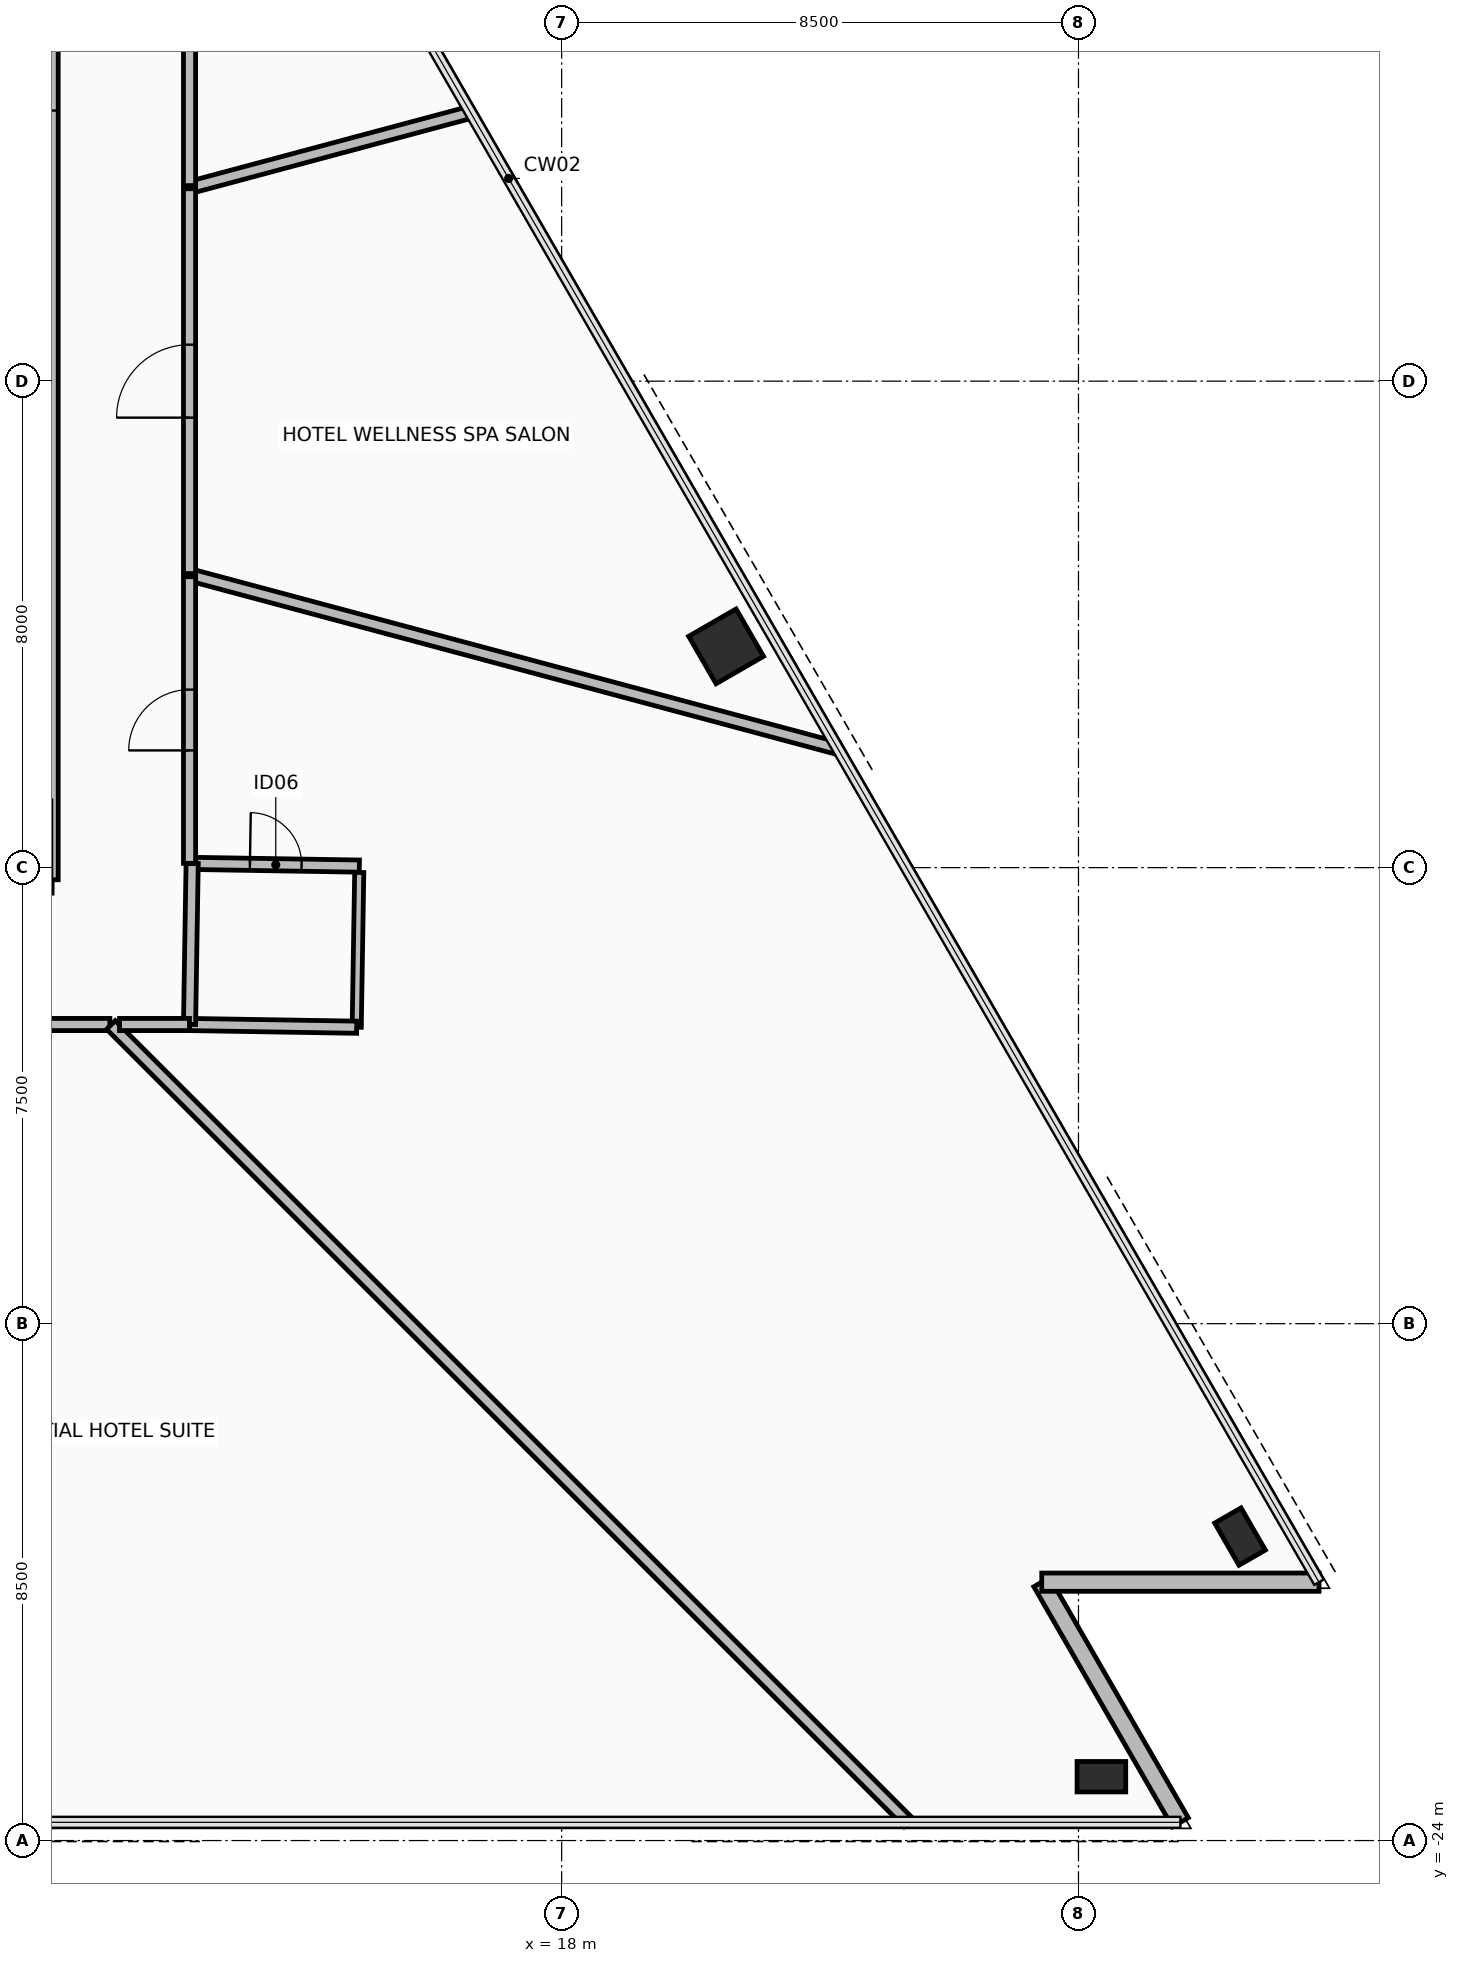
"""IFC4 building model, lengths in metres.
Left out: names, types, materials, properties, quantities, classifications, styles, units other than length and angle.
Written with IfcOpenShell. Run it as: python <this file> out.ifc"""

import sys

from ifc_helpers import new_model, si_unit, direction, frame, frame_2d, origin, origin_2d, place, context, subcontext, project, spatial, rectangle, hollow_rectangle, extrude, element, fill, save


model = new_model("IFC4")
c1 = context("Model", 3, precision=1e-05, world=origin(), true_north=direction((0.0, 1.0)))
c2 = subcontext(c1, "Body", "Model", "MODEL_VIEW")
j1 = project(units=[si_unit("LENGTHUNIT", "METRE"), si_unit("PLANEANGLEUNIT", "RADIAN")], contexts=[c1])
p1 = place(None, origin())
s1 = spatial("IfcSite", under=j1, at=p1, CompositionType="ELEMENT")
p2 = place(p1, origin())
s2 = spatial("IfcBuilding", under=s1, at=p2, CompositionType="ELEMENT")
p3 = place(p2, frame((0.0, 0.0, 52.25)))
s3 = spatial("IfcBuildingStorey", under=s2, at=p3, CompositionType="ELEMENT", Elevation=52.25)
for number, where, z_axis, x_axis in (
    (1, (26.877, -22.95, 0.0), (0.0, 0.0, 1.0), (1.0, 0.0, 0.0)),
    (2, (29.157, -19.001, 0.0), (0.0, 0.0, 1.0), (-0.5, 0.866, 0.0)),
):
    element("IfcColumn", number, at=place(p3, frame(where, z_axis=z_axis, x_axis=x_axis)), inside=s3, PredefinedType="COLUMN", context=c2, shape_type="SweptSolid", body=[
        extrude(hollow_rectangle(XDim=0.5, YDim=0.8, WallThickness=0.04, at=origin_2d()), origin(), (0.0, 0.0, 1.0), 4.75),
    ])
p4 = place(p3, frame((20.705, -4.361, 0.0), z_axis=(0.0, 0.0, 1.0), x_axis=(-0.500001511499, 0.866024531118, 0.0)))
e3 = element("IfcColumn", 3, at=p4, inside=s3, PredefinedType="COLUMN", context=c2, shape_type="SweptSolid", body=[
    extrude(hollow_rectangle(XDim=0.9, YDim=0.9, WallThickness=0.05, at=origin_2d()), origin(), (0.0, 0.0, 1.0), 4.75),
])
p5 = place(p3, frame((28.176, -23.7, 0.0), z_axis=(0.0, 0.0, 1.0), x_axis=(-0.500014431597, 0.866017071537, 0.0)))
e4 = element("IfcWall", 4, at=p5, inside=s3, PredefinedType="STANDARD", context=c2, shape_type="SweptSolid", body=[
    extrude(rectangle(XDim=4.56, YDim=0.3, at=frame_2d((2.28, 0.0))), origin(), (0.0, 0.0, 1.0), 2.255),
])
p6 = place(p3, frame((25.896, -19.751, 0.0), z_axis=(0.0, 0.0, 1.0), x_axis=(1.0, 0.0, 0.0)))
e5 = element("IfcWall", 5, at=p6, inside=s3, PredefinedType="STANDARD", context=c2, shape_type="SweptSolid", body=[
    extrude(rectangle(XDim=4.56, YDim=0.3, at=frame_2d((2.28, 0.0))), origin(), (0.0, 0.0, 1.0), 2.255),
])
p7 = place(p3, frame((-9.62, -8.32, 0.0), z_axis=(0.0, 0.0, 1.0), x_axis=(1.0, 0.0, 0.0)))
e6 = element("IfcWall", 6, at=p7, inside=s3, PredefinedType="PARTITIONING", context=c2, shape_type="SweptSolid", body=[
    extrude(rectangle(XDim=19.24, YDim=0.2, at=frame_2d((9.62, 0.0))), origin(), (0.0, 0.0, 1.0), 2.355),
])
p8 = place(p7, frame((13.97, 0.0, 0.0)))
e7 = element("IfcOpeningElement", 7, at=p8, cuts=e6, PredefinedType="OPENING", context=c2, shape_type="SweptSolid", body=[
    extrude(rectangle(XDim=0.9, YDim=2.1, at=frame_2d((0.45, 1.05))), frame((0.0, 0.11, 0.0), z_axis=(0.0, -1.0, 0.0), x_axis=(1.0, 0.0, 0.0)), (0.0, 0.0, 1.0), 0.22),
])
p9 = place(p3, frame((9.62, -8.2, 0.0), z_axis=(0.0, 0.0, 1.0), x_axis=(0.0, 1.0, 0.0)))
e8 = element("IfcWall", 8, at=p9, inside=s3, PredefinedType="PARTITIONING", context=c2, shape_type="SweptSolid", body=[
    extrude(rectangle(XDim=16.4, YDim=0.2, at=frame_2d((8.2, 0.0))), origin(), (0.0, 0.0, 1.0), 2.355),
])
p10 = place(p9, frame((12.65, 0.0, 0.0)))
e9 = element("IfcOpeningElement", 9, at=p10, cuts=e8, PredefinedType="OPENING", context=c2, shape_type="SweptSolid", body=[
    extrude(rectangle(XDim=1.1, YDim=2.15, at=frame_2d((0.55, 1.075))), frame((0.0, 0.11, 0.0), z_axis=(0.0, -1.0, 0.0), x_axis=(1.0, 0.0, 0.0)), (0.0, 0.0, 1.0), 0.22),
])
p11 = place(p3, frame((11.923, -7.93, 0.0), z_axis=(0.0, 0.0, 1.0), x_axis=(0.999868029143, -0.016245747077, 0.0)))
e10 = element("IfcWall", 10, at=p11, inside=s3, PredefinedType="PARTITIONING", context=c2, shape_type="SweptSolid", body=[
    extrude(rectangle(XDim=2.75, YDim=0.2, at=frame_2d((1.375, 0.0))), origin(), (0.0, 0.0, 1.0), 4.56),
])
p12 = place(p11, frame((0.95, 0.0, 0.0)))
e11 = element("IfcOpeningElement", 11, at=p12, cuts=e10, PredefinedType="OPENING", context=c2, shape_type="SweptSolid", body=[
    extrude(rectangle(XDim=0.85, YDim=2.1, at=frame_2d((0.425, 1.05))), frame((0.0, 0.11, 0.0), z_axis=(0.0, -1.0, 0.0), x_axis=(1.0, 0.0, 0.0)), (0.0, 0.0, 1.0), 0.22),
])
p13 = place(p3, frame((14.671, -8.08, 0.0), z_axis=(0.0, 0.0, 1.0), x_axis=(-0.016307914507, -0.99986701712, 0.0)))
e12 = element("IfcWall", 12, at=p13, inside=s3, PredefinedType="PARTITIONING", context=c2, shape_type="SweptSolid", body=[
    extrude(rectangle(XDim=2.545, YDim=0.15, at=frame_2d((1.272, 0.0))), origin(), (0.0, 0.0, 1.0), 2.355),
])
p14 = place(p3, frame((14.63, -10.625, 0.0), z_axis=(0.0, 0.0, 1.0), x_axis=(-0.999868029143, 0.016245747077, 0.0)))
e13 = element("IfcWall", 13, at=p14, inside=s3, PredefinedType="PARTITIONING", context=c2, shape_type="SweptSolid", body=[
    extrude(rectangle(XDim=2.75, YDim=0.2, at=frame_2d((1.375, 0.0))), origin(), (0.0, 0.0, 1.0), 2.355),
])
p15 = place(p3, frame((11.88, -10.578, 0.0), z_axis=(0.0, 0.0, 1.0), x_axis=(0.016318711927, 0.999866840955, 0.0)))
e14 = element("IfcWall", 14, at=p15, inside=s3, PredefinedType="PARTITIONING", context=c2, shape_type="SweptSolid", body=[
    extrude(rectangle(XDim=2.648, YDim=0.2, at=frame_2d((1.324, 0.0))), origin(), (0.0, 0.0, 1.0), 2.355),
])
p16 = place(p3, frame((16.5, 4.421, 0.0), z_axis=(0.0, 0.0, 1.0), x_axis=(-0.965923733473, -0.258826855473, 0.0)))
e15 = element("IfcWall", 15, at=p16, inside=s3, PredefinedType="PARTITIONING", context=c2, shape_type="SweptSolid", body=[
    extrude(rectangle(XDim=4.75, YDim=0.2, at=frame_2d((2.375, 0.0))), origin(), (0.0, 0.0, 1.0), 2.255),
])
p17 = place(p3, frame((11.88, 3.216, 0.0), z_axis=(0.0, 0.0, 1.0), x_axis=(0.0, 1.0, 0.0)))
e16 = element("IfcWall", 16, at=p17, inside=s3, PredefinedType="PARTITIONING", context=c2, shape_type="SweptSolid", body=[
    extrude(rectangle(XDim=7.259, YDim=0.2, at=frame_2d((3.63, 0.0))), origin(), (0.0, 0.0, 1.0), 2.255),
])
p18 = place(p17, frame((3.03, 0.0, 0.0)))
e17 = element("IfcOpeningElement", 17, at=p18, cuts=e16, PredefinedType="OPENING", context=c2, shape_type="SweptSolid", body=[
    extrude(rectangle(XDim=1.2, YDim=2.15, at=frame_2d((0.6, 1.075))), frame((0.0, 0.11, 0.0), z_axis=(0.0, -1.0, 0.0), x_axis=(1.0, 0.0, 0.0)), (0.0, 0.0, 1.0), 0.22),
])
p19 = place(p3, frame((2.867, -10.58, 0.0), z_axis=(0.0, 0.0, 1.0), x_axis=(1.0, 0.0, 0.0)))
e18 = element("IfcWall", 18, at=p19, inside=s3, PredefinedType="PARTITIONING", context=c2, shape_type="SweptSolid", body=[
    extrude(rectangle(XDim=7.702, YDim=0.2, at=frame_2d((3.851, 0.0))), origin(), (0.0, 0.0, 1.0), 2.355),
])
p20 = place(p19, frame((3.351, 0.0, 0.0)))
e19 = element("IfcOpeningElement", 19, at=p20, cuts=e18, PredefinedType="OPENING", context=c2, shape_type="SweptSolid", body=[
    extrude(rectangle(XDim=1.0, YDim=2.15, at=frame_2d((0.5, 1.075))), frame((0.0, 0.11, 0.0), z_axis=(0.0, -1.0, 0.0), x_axis=(1.0, 0.0, 0.0)), (0.0, 0.0, 1.0), 0.22),
])
p21 = place(p3, frame((10.587, -10.587, 0.0), z_axis=(0.0, 0.0, 1.0), x_axis=(0.707106781187, -0.707106781187, 0.0)))
e20 = element("IfcWall", 20, at=p21, inside=s3, PredefinedType="PARTITIONING", context=c2, shape_type="SweptSolid", body=[
    extrude(rectangle(XDim=18.544, YDim=0.2, at=frame_2d((9.272, 0.0))), origin(), (0.0, 0.0, 1.0), 2.255),
])
p22 = place(p3, frame((11.912, -3.192, 0.0), z_axis=(0.0, 0.0, 1.0), x_axis=(0.965922374415, -0.258831927328, 0.0)))
e21 = element("IfcWall", 21, at=p22, inside=s3, PredefinedType="PARTITIONING", context=c2, shape_type="SweptSolid", body=[
    extrude(rectangle(XDim=10.992, YDim=0.2, at=frame_2d((5.496, 0.0))), origin(), (0.0, 0.0, 1.0), 2.255),
])
p23 = place(p3, frame((10.729, -10.58, 0.0), z_axis=(0.0, 0.0, 1.0), x_axis=(1.0, 0.0, 0.0)))
e22 = element("IfcWall", 22, at=p23, inside=s3, PredefinedType="PARTITIONING", context=c2, shape_type="SweptSolid", body=[
    extrude(rectangle(XDim=1.151, YDim=0.2, at=frame_2d((0.575, 0.0))), origin(), (0.0, 0.0, 1.0), 4.56),
])
p24 = place(p3, frame((11.88, -7.93, 0.0), z_axis=(0.0, 0.0, 1.0), x_axis=(0.0, 1.0, 0.0)))
e23 = element("IfcWall", 23, at=p24, inside=s3, PredefinedType="PARTITIONING", context=c2, shape_type="SweptSolid", body=[
    extrude(rectangle(XDim=4.714, YDim=0.2, at=frame_2d((2.357, 0.0))), origin(), (0.0, 0.0, 1.0), 2.755),
])
p25 = place(p24, frame((1.857, 0.0, 0.0)))
e24 = element("IfcOpeningElement", 24, at=p25, cuts=e23, PredefinedType="OPENING", context=c2, shape_type="SweptSolid", body=[
    extrude(rectangle(XDim=1.0, YDim=2.15, at=frame_2d((0.5, 1.075))), frame((0.0, 0.11, 0.0), z_axis=(0.0, -1.0, 0.0), x_axis=(1.0, 0.0, 0.0)), (0.0, 0.0, 1.0), 0.22),
])
p26 = place(p3, frame((11.88, -3.164, 0.0), z_axis=(0.0, 0.0, 1.0), x_axis=(0.0, 1.0, 0.0)))
e25 = element("IfcWall", 25, at=p26, inside=s3, PredefinedType="PARTITIONING", context=c2, shape_type="SweptSolid", body=[
    extrude(rectangle(XDim=6.328, YDim=0.2, at=frame_2d((3.164, 0.0))), origin(), (0.0, 0.0, 1.0), 4.56),
])
p27 = place(p26, frame((2.564, 0.0, 0.0)))
e26 = element("IfcOpeningElement", 26, at=p27, cuts=e25, PredefinedType="OPENING", context=c2, shape_type="SweptSolid", body=[
    extrude(rectangle(XDim=1.2, YDim=2.15, at=frame_2d((0.6, 1.075))), frame((0.0, 0.11, 0.0), z_axis=(0.0, -1.0, 0.0), x_axis=(1.0, 0.0, 0.0)), (0.0, 0.0, 1.0), 0.22),
])
p28 = place(p10, frame((1.1, 0.0, 0.0), z_axis=(0.0, 0.0, 1.0), x_axis=(-1.0, 0.0, 0.0)))
e27 = element("IfcDoor", 27, at=p28, inside=s3, OperationType="SINGLE_SWING_LEFT", PredefinedType="DOOR", context=c2, shape_type="SweptSolid", body=[
    extrude(rectangle(XDim=1.1, YDim=2.15, at=frame_2d((0.55, 1.075))), frame((0.0, 0.025, 0.0), z_axis=(0.0, -1.0, 0.0), x_axis=(1.0, 0.0, 0.0)), (0.0, 0.0, 1.0), 0.05),
])
fill(e9, e27)
p29 = place(p12, origin())
e28 = element("IfcDoor", 28, at=p29, inside=s3, OperationType="SINGLE_SWING_RIGHT", PredefinedType="DOOR", context=c2, shape_type="SweptSolid", body=[
    extrude(rectangle(XDim=0.85, YDim=2.1, at=frame_2d((0.425, 1.05))), frame((0.0, 0.025, 0.0), z_axis=(0.0, -1.0, 0.0), x_axis=(1.0, 0.0, 0.0)), (0.0, 0.0, 1.0), 0.05),
])
fill(e11, e28)
p30 = place(p25, origin())
e29 = element("IfcDoor", 29, at=p30, inside=s3, OperationType="SINGLE_SWING_LEFT", PredefinedType="DOOR", context=c2, shape_type="SweptSolid", body=[
    extrude(rectangle(XDim=1.0, YDim=2.15, at=frame_2d((0.5, 1.075))), frame((0.0, 0.025, 0.0), z_axis=(0.0, -1.0, 0.0), x_axis=(1.0, 0.0, 0.0)), (0.0, 0.0, 1.0), 0.05),
])
fill(e24, e29)
p31 = place(p27, origin())
e30 = element("IfcDoor", 30, at=p31, inside=s3, OperationType="SINGLE_SWING_LEFT", PredefinedType="DOOR", context=c2, shape_type="SweptSolid", body=[
    extrude(rectangle(XDim=1.2, YDim=2.15, at=frame_2d((0.6, 1.075))), frame((0.0, 0.025, 0.0), z_axis=(0.0, -1.0, 0.0), x_axis=(1.0, 0.0, 0.0)), (0.0, 0.0, 1.0), 0.05),
])
fill(e26, e30)
save(model, sys.argv[1])
